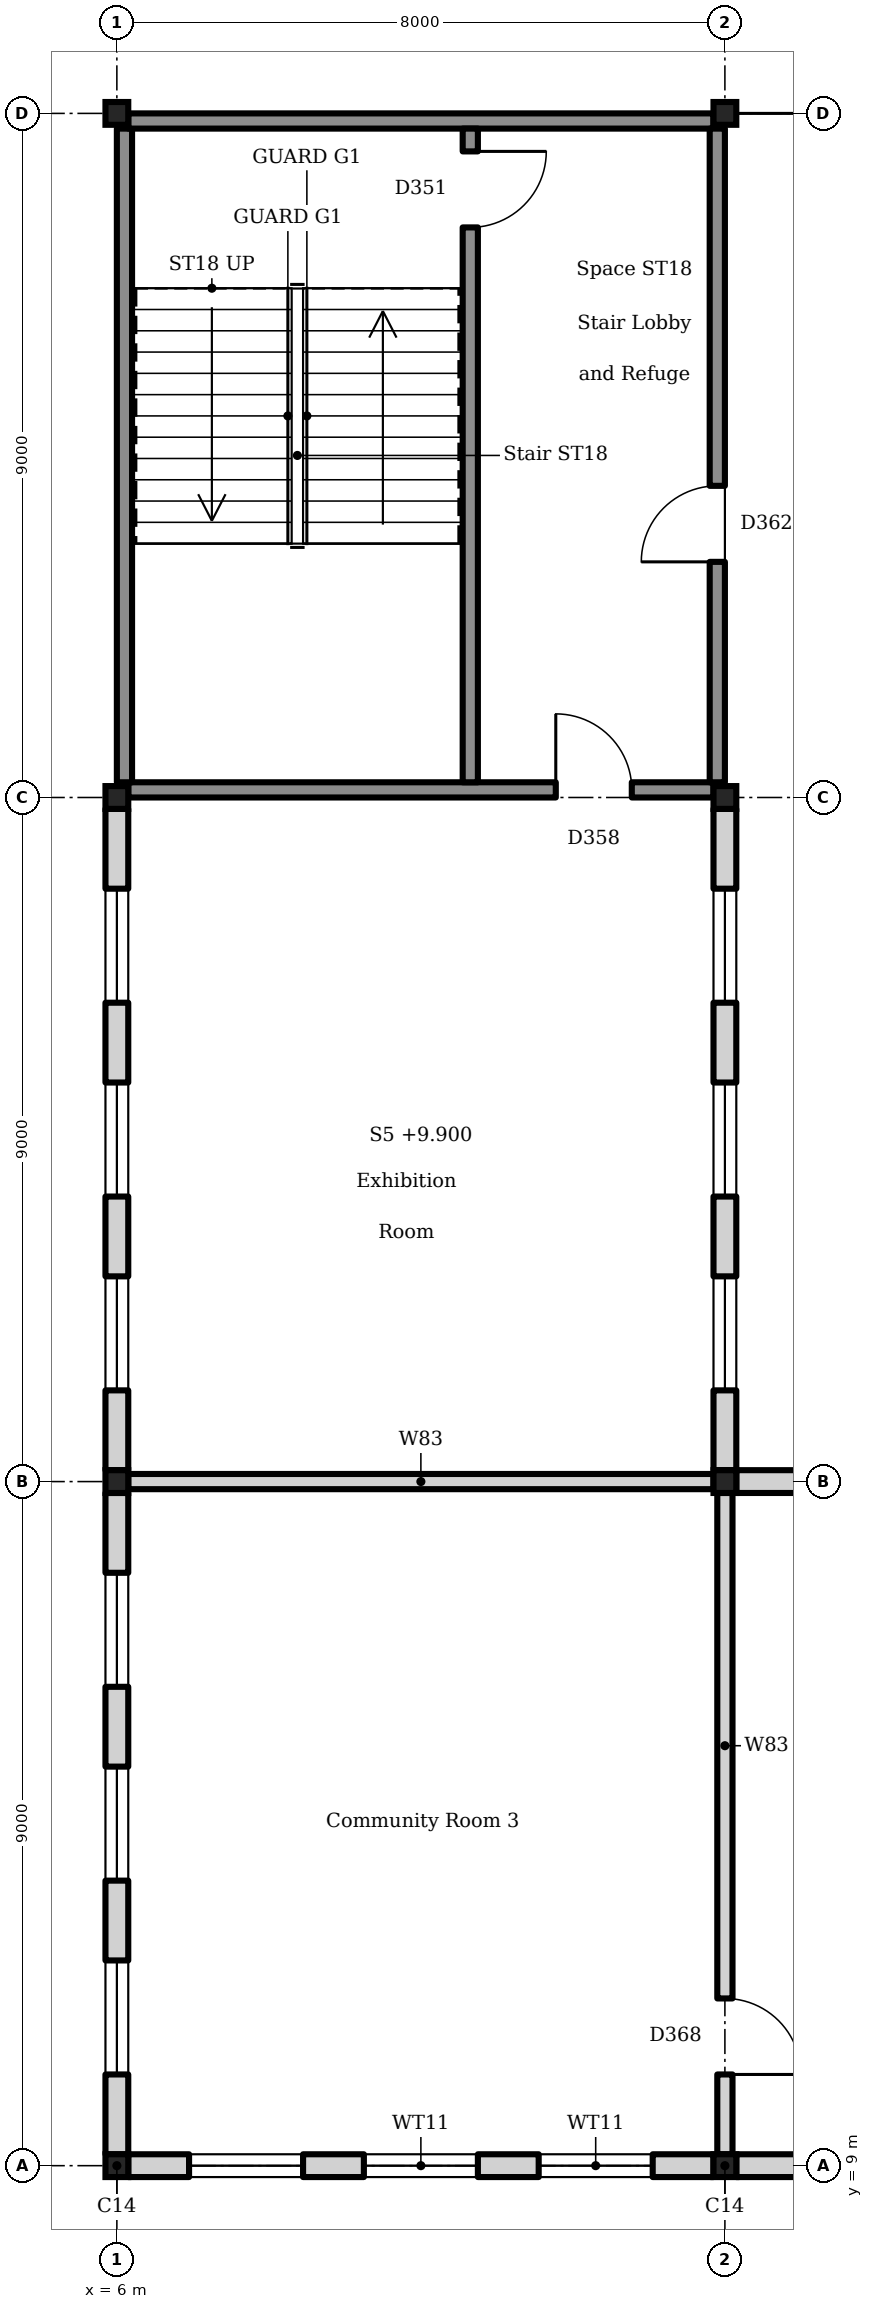
"""IFC4 building model, lengths in metres.
Left out: names, types, materials, properties, quantities, classifications, styles, units other than length and angle.
Written with IfcOpenShell. Run it as: python <this file> out.ifc"""

import sys

from ifc_helpers import new_model, si_unit, direction, frame, frame_2d, origin, origin_2d, place, context, subcontext, project, spatial, rectangle, i_section, extrude, element, fill, save


model = new_model("IFC4")
c1 = context("Model", 3, precision=1e-05, world=origin(), true_north=direction((0.0, 1.0)))
c2 = subcontext(c1, "Body", "Model", "MODEL_VIEW")
j1 = project(units=[si_unit("LENGTHUNIT", "METRE"), si_unit("PLANEANGLEUNIT", "RADIAN")], contexts=[c1])
p1 = place(None, origin())
s1 = spatial("IfcSite", under=j1, at=p1, CompositionType="ELEMENT")
p2 = place(p1, origin())
s2 = spatial("IfcBuilding", under=s1, at=p2, CompositionType="ELEMENT")
p3 = place(p2, frame((0.0, 0.0, 9.9)))
s3 = spatial("IfcBuildingStorey", under=s2, at=p3, CompositionType="ELEMENT", Elevation=9.9)
for number, where, z_axis, x_axis in (
    (1, (6.0, 9.0, 0.0), (0.0, 0.0, 1.0), (1.0, 0.0, 0.0)),
    (2, (6.0, 18.0, 0.0), (0.0, 0.0, 1.0), (1.0, 0.0, 0.0)),
):
    element("IfcColumn", number, at=place(p3, frame(where, z_axis=z_axis, x_axis=x_axis)), inside=s3, PredefinedType="COLUMN", context=c2, shape_type="SweptSolid", body=[
        extrude(i_section(OverallWidth=0.3, OverallDepth=0.3, WebThickness=0.011, FlangeThickness=0.019, FilletRadius=0.027, at=origin_2d()), origin(), (0.0, 0.0, 1.0), 4.3),
    ])
for number, where, z_axis, x_axis in (
    (3, (6.0, 27.0, 0.0), (0.0, 0.0, 1.0), (1.0, 0.0, 0.0)),
    (4, (6.0, 36.0, 0.0), (0.0, 0.0, 1.0), (1.0, 0.0, 0.0)),
):
    element("IfcColumn", number, at=place(p3, frame(where, z_axis=z_axis, x_axis=x_axis)), inside=s3, PredefinedType="COLUMN", context=c2, shape_type="SweptSolid", body=[
        extrude(i_section(OverallWidth=0.3, OverallDepth=0.3, WebThickness=0.011, FlangeThickness=0.019, FilletRadius=0.027, at=origin_2d()), origin(), (0.0, 0.0, 1.0), 4.5),
    ])
for number, where, z_axis, x_axis in (
    (5, (14.0, 9.0, 0.0), (0.0, 0.0, 1.0), (1.0, 0.0, 0.0)),
    (6, (14.0, 18.0, 0.0), (0.0, 0.0, 1.0), (1.0, 0.0, 0.0)),
):
    element("IfcColumn", number, at=place(p3, frame(where, z_axis=z_axis, x_axis=x_axis)), inside=s3, PredefinedType="COLUMN", context=c2, shape_type="SweptSolid", body=[
        extrude(i_section(OverallWidth=0.3, OverallDepth=0.3, WebThickness=0.011, FlangeThickness=0.019, FilletRadius=0.027, at=origin_2d()), origin(), (0.0, 0.0, 1.0), 4.3),
    ])
for number, where, z_axis, x_axis in (
    (7, (14.0, 27.0, 0.0), (0.0, 0.0, 1.0), (1.0, 0.0, 0.0)),
    (8, (14.0, 36.0, 0.0), (0.0, 0.0, 1.0), (1.0, 0.0, 0.0)),
):
    element("IfcColumn", number, at=place(p3, frame(where, z_axis=z_axis, x_axis=x_axis)), inside=s3, PredefinedType="COLUMN", context=c2, shape_type="SweptSolid", body=[
        extrude(i_section(OverallWidth=0.3, OverallDepth=0.3, WebThickness=0.011, FlangeThickness=0.019, FilletRadius=0.027, at=origin_2d()), origin(), (0.0, 0.0, 1.0), 4.5),
    ])
p4 = place(p3, frame((6.15, 9.0, 0.0), z_axis=(0.0, 0.0, 1.0), x_axis=(1.0, 0.0, 0.0)))
e9 = element("IfcWall", 9, at=p4, inside=s3, PredefinedType="SOLIDWALL", context=c2, shape_type="SweptSolid", body=[
    extrude(rectangle(XDim=7.7, YDim=0.3, at=frame_2d((3.85, 0.0))), origin(), (0.0, 0.0, 1.0), 3.93),
])
p5 = place(p4, frame((0.8, 0.0, 1.1)))
e10 = element("IfcOpeningElement", 10, at=p5, cuts=e9, PredefinedType="OPENING", context=c2, shape_type="SweptSolid", body=[
    extrude(rectangle(XDim=1.5, YDim=2.4, at=frame_2d((0.75, 1.2))), frame((0.0, 0.16, 0.0), z_axis=(0.0, -1.0, 0.0), x_axis=(1.0, 0.0, 0.0)), (0.0, 0.0, 1.0), 0.32),
])
p6 = place(p4, frame((3.1, 0.0, 1.1)))
e11 = element("IfcOpeningElement", 11, at=p6, cuts=e9, PredefinedType="OPENING", context=c2, shape_type="SweptSolid", body=[
    extrude(rectangle(XDim=1.5, YDim=2.4, at=frame_2d((0.75, 1.2))), frame((0.0, 0.16, 0.0), z_axis=(0.0, -1.0, 0.0), x_axis=(1.0, 0.0, 0.0)), (0.0, 0.0, 1.0), 0.32),
])
p7 = place(p4, frame((5.4, 0.0, 1.1)))
e12 = element("IfcOpeningElement", 12, at=p7, cuts=e9, PredefinedType="OPENING", context=c2, shape_type="SweptSolid", body=[
    extrude(rectangle(XDim=1.5, YDim=2.4, at=frame_2d((0.75, 1.2))), frame((0.0, 0.16, 0.0), z_axis=(0.0, -1.0, 0.0), x_axis=(1.0, 0.0, 0.0)), (0.0, 0.0, 1.0), 0.32),
])
p8 = place(p3, frame((14.15, 9.0, 0.0), z_axis=(0.0, 0.0, 1.0), x_axis=(1.0, 0.0, 0.0)))
e13 = element("IfcWall", 13, at=p8, inside=s3, PredefinedType="SOLIDWALL", context=c2, shape_type="SweptSolid", body=[
    extrude(rectangle(XDim=7.7, YDim=0.3, at=frame_2d((3.85, 0.0))), origin(), (0.0, 0.0, 1.0), 3.93),
])
p9 = place(p8, frame((0.8, 0.0, 1.1)))
e14 = element("IfcOpeningElement", 14, at=p9, cuts=e13, PredefinedType="OPENING", context=c2, shape_type="SweptSolid", body=[
    extrude(rectangle(XDim=1.5, YDim=2.4, at=frame_2d((0.75, 1.2))), frame((0.0, 0.16, 0.0), z_axis=(0.0, -1.0, 0.0), x_axis=(1.0, 0.0, 0.0)), (0.0, 0.0, 1.0), 0.32),
])
p10 = place(p8, frame((3.1, 0.0, 1.1)))
e15 = element("IfcOpeningElement", 15, at=p10, cuts=e13, PredefinedType="OPENING", context=c2, shape_type="SweptSolid", body=[
    extrude(rectangle(XDim=1.5, YDim=2.4, at=frame_2d((0.75, 1.2))), frame((0.0, 0.16, 0.0), z_axis=(0.0, -1.0, 0.0), x_axis=(1.0, 0.0, 0.0)), (0.0, 0.0, 1.0), 0.32),
])
p11 = place(p3, frame((6.0, 9.15, 0.0), z_axis=(0.0, 0.0, 1.0), x_axis=(0.0, 1.0, 0.0)))
e16 = element("IfcWall", 16, at=p11, inside=s3, PredefinedType="SOLIDWALL", context=c2, shape_type="SweptSolid", body=[
    extrude(rectangle(XDim=8.7, YDim=0.3, at=frame_2d((4.35, 0.0))), origin(), (0.0, 0.0, 1.0), 3.93),
])
p12 = place(p11, frame((1.05, 0.0, 1.1)))
e17 = element("IfcOpeningElement", 17, at=p12, cuts=e16, PredefinedType="OPENING", context=c2, shape_type="SweptSolid", body=[
    extrude(rectangle(XDim=1.5, YDim=2.4, at=frame_2d((0.75, 1.2))), frame((0.0, 0.16, 0.0), z_axis=(0.0, -1.0, 0.0), x_axis=(1.0, 0.0, 0.0)), (0.0, 0.0, 1.0), 0.32),
])
p13 = place(p11, frame((3.6, 0.0, 1.1)))
e18 = element("IfcOpeningElement", 18, at=p13, cuts=e16, PredefinedType="OPENING", context=c2, shape_type="SweptSolid", body=[
    extrude(rectangle(XDim=1.5, YDim=2.4, at=frame_2d((0.75, 1.2))), frame((0.0, 0.16, 0.0), z_axis=(0.0, -1.0, 0.0), x_axis=(1.0, 0.0, 0.0)), (0.0, 0.0, 1.0), 0.32),
])
p14 = place(p11, frame((6.15, 0.0, 1.1)))
e19 = element("IfcOpeningElement", 19, at=p14, cuts=e16, PredefinedType="OPENING", context=c2, shape_type="SweptSolid", body=[
    extrude(rectangle(XDim=1.5, YDim=2.4, at=frame_2d((0.75, 1.2))), frame((0.0, 0.16, 0.0), z_axis=(0.0, -1.0, 0.0), x_axis=(1.0, 0.0, 0.0)), (0.0, 0.0, 1.0), 0.32),
])
p15 = place(p3, frame((6.0, 18.15, 0.0), z_axis=(0.0, 0.0, 1.0), x_axis=(0.0, 1.0, 0.0)))
e20 = element("IfcWall", 20, at=p15, inside=s3, PredefinedType="SOLIDWALL", context=c2, shape_type="SweptSolid", body=[
    extrude(rectangle(XDim=8.7, YDim=0.3, at=frame_2d((4.35, 0.0))), origin(), (0.0, 0.0, 1.0), 3.93),
])
p16 = place(p15, frame((1.05, 0.0, 1.1)))
e21 = element("IfcOpeningElement", 21, at=p16, cuts=e20, PredefinedType="OPENING", context=c2, shape_type="SweptSolid", body=[
    extrude(rectangle(XDim=1.5, YDim=2.4, at=frame_2d((0.75, 1.2))), frame((0.0, 0.16, 0.0), z_axis=(0.0, -1.0, 0.0), x_axis=(1.0, 0.0, 0.0)), (0.0, 0.0, 1.0), 0.32),
])
p17 = place(p15, frame((3.6, 0.0, 1.1)))
e22 = element("IfcOpeningElement", 22, at=p17, cuts=e20, PredefinedType="OPENING", context=c2, shape_type="SweptSolid", body=[
    extrude(rectangle(XDim=1.5, YDim=2.4, at=frame_2d((0.75, 1.2))), frame((0.0, 0.16, 0.0), z_axis=(0.0, -1.0, 0.0), x_axis=(1.0, 0.0, 0.0)), (0.0, 0.0, 1.0), 0.32),
])
p18 = place(p15, frame((6.15, 0.0, 1.1)))
e23 = element("IfcOpeningElement", 23, at=p18, cuts=e20, PredefinedType="OPENING", context=c2, shape_type="SweptSolid", body=[
    extrude(rectangle(XDim=1.5, YDim=2.4, at=frame_2d((0.75, 1.2))), frame((0.0, 0.16, 0.0), z_axis=(0.0, -1.0, 0.0), x_axis=(1.0, 0.0, 0.0)), (0.0, 0.0, 1.0), 0.32),
])
p19 = place(p3, frame((14.0, 18.15, 0.0), z_axis=(0.0, 0.0, 1.0), x_axis=(0.0, 1.0, 0.0)))
e24 = element("IfcWall", 24, at=p19, inside=s3, PredefinedType="SOLIDWALL", context=c2, shape_type="SweptSolid", body=[
    extrude(rectangle(XDim=8.7, YDim=0.3, at=frame_2d((4.35, 0.0))), origin(), (0.0, 0.0, 1.0), 3.93),
])
p20 = place(p19, frame((1.05, 0.0, 1.1)))
e25 = element("IfcOpeningElement", 25, at=p20, cuts=e24, PredefinedType="OPENING", context=c2, shape_type="SweptSolid", body=[
    extrude(rectangle(XDim=1.5, YDim=2.4, at=frame_2d((0.75, 1.2))), frame((0.0, 0.16, 0.0), z_axis=(0.0, -1.0, 0.0), x_axis=(1.0, 0.0, 0.0)), (0.0, 0.0, 1.0), 0.32),
])
p21 = place(p19, frame((3.6, 0.0, 1.1)))
e26 = element("IfcOpeningElement", 26, at=p21, cuts=e24, PredefinedType="OPENING", context=c2, shape_type="SweptSolid", body=[
    extrude(rectangle(XDim=1.5, YDim=2.4, at=frame_2d((0.75, 1.2))), frame((0.0, 0.16, 0.0), z_axis=(0.0, -1.0, 0.0), x_axis=(1.0, 0.0, 0.0)), (0.0, 0.0, 1.0), 0.32),
])
p22 = place(p19, frame((6.15, 0.0, 1.1)))
e27 = element("IfcOpeningElement", 27, at=p22, cuts=e24, PredefinedType="OPENING", context=c2, shape_type="SweptSolid", body=[
    extrude(rectangle(XDim=1.5, YDim=2.4, at=frame_2d((0.75, 1.2))), frame((0.0, 0.16, 0.0), z_axis=(0.0, -1.0, 0.0), x_axis=(1.0, 0.0, 0.0)), (0.0, 0.0, 1.0), 0.32),
])
p23 = place(p3, frame((14.15, 18.0, 0.0), z_axis=(0.0, 0.0, 1.0), x_axis=(1.0, 0.0, 0.0)))
e28 = element("IfcWall", 28, at=p23, inside=s3, PredefinedType="SOLIDWALL", context=c2, shape_type="SweptSolid", body=[
    extrude(rectangle(XDim=7.7, YDim=0.3, at=frame_2d((3.85, 0.0))), origin(), (0.0, 0.0, 1.0), 3.93),
])
p24 = place(p23, frame((2.95, 0.0, 0.0)))
e29 = element("IfcOpeningElement", 29, at=p24, cuts=e28, PredefinedType="OPENING", context=c2, shape_type="SweptSolid", body=[
    extrude(rectangle(XDim=1.8, YDim=2.4, at=frame_2d((0.9, 1.2))), frame((0.0, 0.16, 0.0), z_axis=(0.0, -1.0, 0.0), x_axis=(1.0, 0.0, 0.0)), (0.0, 0.0, 1.0), 0.32),
])
p25 = place(p3, frame((6.15, 27.1, 0.0), z_axis=(0.0, 0.0, 1.0), x_axis=(1.0, 0.0, 0.0)))
e30 = element("IfcWall", 30, at=p25, inside=s3, PredefinedType="SOLIDWALL", context=c2, shape_type="SweptSolid", body=[
    extrude(rectangle(XDim=7.7, YDim=0.2, at=frame_2d((3.85, 0.0))), origin(), (0.0, 0.0, 1.0), 4.3),
])
p26 = place(p25, frame((5.625, 0.0, 0.0)))
e31 = element("IfcOpeningElement", 31, at=p26, cuts=e30, PredefinedType="OPENING", context=c2, shape_type="SweptSolid", body=[
    extrude(rectangle(XDim=1.0, YDim=2.1, at=frame_2d((0.5, 1.05))), frame((0.0, 0.11, 0.0), z_axis=(0.0, -1.0, 0.0), x_axis=(1.0, 0.0, 0.0)), (0.0, 0.0, 1.0), 0.22),
])
p27 = place(p3, frame((6.1, 27.2, 0.0), z_axis=(0.0, 0.0, 1.0), x_axis=(0.0, 1.0, 0.0)))
e32 = element("IfcWall", 32, at=p27, inside=s3, PredefinedType="SOLIDWALL", context=c2, shape_type="SweptSolid", body=[
    extrude(rectangle(XDim=8.6, YDim=0.2, at=frame_2d((4.3, 0.0))), origin(), (0.0, 0.0, 1.0), 4.3),
])
p28 = place(p3, frame((6.15, 35.9, 0.0), z_axis=(0.0, 0.0, 1.0), x_axis=(1.0, 0.0, 0.0)))
e33 = element("IfcWall", 33, at=p28, inside=s3, PredefinedType="SOLIDWALL", context=c2, shape_type="SweptSolid", body=[
    extrude(rectangle(XDim=7.7, YDim=0.2, at=frame_2d((3.85, 0.0))), origin(), (0.0, 0.0, 1.0), 4.3),
])
p29 = place(p3, frame((13.9, 27.2, 0.0), z_axis=(0.0, 0.0, 1.0), x_axis=(0.0, 1.0, 0.0)))
e34 = element("IfcWall", 34, at=p29, inside=s3, PredefinedType="SOLIDWALL", context=c2, shape_type="SweptSolid", body=[
    extrude(rectangle(XDim=8.6, YDim=0.2, at=frame_2d((4.3, 0.0))), origin(), (0.0, 0.0, 1.0), 4.3),
])
p30 = place(p29, frame((2.9, 0.0, 0.0)))
e35 = element("IfcOpeningElement", 35, at=p30, cuts=e34, PredefinedType="OPENING", context=c2, shape_type="SweptSolid", body=[
    extrude(rectangle(XDim=1.0, YDim=2.1, at=frame_2d((0.5, 1.05))), frame((0.0, 0.11, 0.0), z_axis=(0.0, -1.0, 0.0), x_axis=(1.0, 0.0, 0.0)), (0.0, 0.0, 1.0), 0.22),
])
p31 = place(p3, frame((10.65, 27.2, 0.0), z_axis=(0.0, 0.0, 1.0), x_axis=(0.0, 1.0, 0.0)))
e36 = element("IfcWall", 36, at=p31, inside=s3, PredefinedType="SOLIDWALL", context=c2, shape_type="SweptSolid", body=[
    extrude(rectangle(XDim=8.6, YDim=0.2, at=frame_2d((4.3, 0.0))), origin(), (0.0, 0.0, 1.0), 4.3),
])
p32 = place(p31, frame((7.3, 0.0, 0.0)))
e37 = element("IfcOpeningElement", 37, at=p32, cuts=e36, PredefinedType="OPENING", context=c2, shape_type="SweptSolid", body=[
    extrude(rectangle(XDim=1.0, YDim=2.1, at=frame_2d((0.5, 1.05))), frame((0.0, 0.11, 0.0), z_axis=(0.0, -1.0, 0.0), x_axis=(1.0, 0.0, 0.0)), (0.0, 0.0, 1.0), 0.22),
])
p33 = place(p3, frame((6.15, 18.0, 0.0), z_axis=(0.0, 0.0, 1.0), x_axis=(1.0, 0.0, 0.0)))
e38 = element("IfcWall", 38, at=p33, inside=s3, PredefinedType="PARTITIONING", context=c2, shape_type="SweptSolid", body=[
    extrude(rectangle(XDim=7.7, YDim=0.2, at=frame_2d((3.85, 0.0))), origin(), (0.0, 0.0, 1.0), 3.93),
])
p34 = place(p3, frame((14.0, 9.15, 0.0), z_axis=(0.0, 0.0, 1.0), x_axis=(0.0, 1.0, 0.0)))
e39 = element("IfcWall", 39, at=p34, inside=s3, PredefinedType="PARTITIONING", context=c2, shape_type="SweptSolid", body=[
    extrude(rectangle(XDim=8.7, YDim=0.2, at=frame_2d((4.35, 0.0))), origin(), (0.0, 0.0, 1.0), 3.93),
])
p35 = place(p34, frame((1.05, 0.0, 0.0)))
e40 = element("IfcOpeningElement", 40, at=p35, cuts=e39, PredefinedType="OPENING", context=c2, shape_type="SweptSolid", body=[
    extrude(rectangle(XDim=1.0, YDim=2.1, at=frame_2d((0.5, 1.05))), frame((0.0, 0.11, 0.0), z_axis=(0.0, -1.0, 0.0), x_axis=(1.0, 0.0, 0.0)), (0.0, 0.0, 1.0), 0.22),
])
p36 = place(p5, origin())
e41 = element("IfcWindow", 41, at=p36, inside=s3, PartitioningType="SINGLE_PANEL", PredefinedType="WINDOW", context=c2, shape_type="SweptSolid", body=[
    extrude(rectangle(XDim=1.5, YDim=2.4, at=frame_2d((0.75, 1.2))), frame((0.0, 0.03, 0.0), z_axis=(0.0, -1.0, 0.0), x_axis=(1.0, 0.0, 0.0)), (0.0, 0.0, 1.0), 0.06),
])
fill(e10, e41)
p37 = place(p6, origin())
e42 = element("IfcWindow", 42, at=p37, inside=s3, PartitioningType="SINGLE_PANEL", PredefinedType="WINDOW", context=c2, shape_type="SweptSolid", body=[
    extrude(rectangle(XDim=1.5, YDim=2.4, at=frame_2d((0.75, 1.2))), frame((0.0, 0.03, 0.0), z_axis=(0.0, -1.0, 0.0), x_axis=(1.0, 0.0, 0.0)), (0.0, 0.0, 1.0), 0.06),
])
fill(e11, e42)
p38 = place(p7, origin())
e43 = element("IfcWindow", 43, at=p38, inside=s3, PartitioningType="SINGLE_PANEL", PredefinedType="WINDOW", context=c2, shape_type="SweptSolid", body=[
    extrude(rectangle(XDim=1.5, YDim=2.4, at=frame_2d((0.75, 1.2))), frame((0.0, 0.03, 0.0), z_axis=(0.0, -1.0, 0.0), x_axis=(1.0, 0.0, 0.0)), (0.0, 0.0, 1.0), 0.06),
])
fill(e12, e43)
p39 = place(p12, origin())
e44 = element("IfcWindow", 44, at=p39, inside=s3, PartitioningType="SINGLE_PANEL", PredefinedType="WINDOW", context=c2, shape_type="SweptSolid", body=[
    extrude(rectangle(XDim=1.5, YDim=2.4, at=frame_2d((0.75, 1.2))), frame((0.0, 0.03, 0.0), z_axis=(0.0, -1.0, 0.0), x_axis=(1.0, 0.0, 0.0)), (0.0, 0.0, 1.0), 0.06),
])
fill(e17, e44)
p40 = place(p13, origin())
e45 = element("IfcWindow", 45, at=p40, inside=s3, PartitioningType="SINGLE_PANEL", PredefinedType="WINDOW", context=c2, shape_type="SweptSolid", body=[
    extrude(rectangle(XDim=1.5, YDim=2.4, at=frame_2d((0.75, 1.2))), frame((0.0, 0.03, 0.0), z_axis=(0.0, -1.0, 0.0), x_axis=(1.0, 0.0, 0.0)), (0.0, 0.0, 1.0), 0.06),
])
fill(e18, e45)
p41 = place(p14, origin())
e46 = element("IfcWindow", 46, at=p41, inside=s3, PartitioningType="SINGLE_PANEL", PredefinedType="WINDOW", context=c2, shape_type="SweptSolid", body=[
    extrude(rectangle(XDim=1.5, YDim=2.4, at=frame_2d((0.75, 1.2))), frame((0.0, 0.03, 0.0), z_axis=(0.0, -1.0, 0.0), x_axis=(1.0, 0.0, 0.0)), (0.0, 0.0, 1.0), 0.06),
])
fill(e19, e46)
p42 = place(p16, origin())
e47 = element("IfcWindow", 47, at=p42, inside=s3, PartitioningType="SINGLE_PANEL", PredefinedType="WINDOW", context=c2, shape_type="SweptSolid", body=[
    extrude(rectangle(XDim=1.5, YDim=2.4, at=frame_2d((0.75, 1.2))), frame((0.0, 0.03, 0.0), z_axis=(0.0, -1.0, 0.0), x_axis=(1.0, 0.0, 0.0)), (0.0, 0.0, 1.0), 0.06),
])
fill(e21, e47)
p43 = place(p17, origin())
e48 = element("IfcWindow", 48, at=p43, inside=s3, PartitioningType="SINGLE_PANEL", PredefinedType="WINDOW", context=c2, shape_type="SweptSolid", body=[
    extrude(rectangle(XDim=1.5, YDim=2.4, at=frame_2d((0.75, 1.2))), frame((0.0, 0.03, 0.0), z_axis=(0.0, -1.0, 0.0), x_axis=(1.0, 0.0, 0.0)), (0.0, 0.0, 1.0), 0.06),
])
fill(e22, e48)
p44 = place(p18, origin())
e49 = element("IfcWindow", 49, at=p44, inside=s3, PartitioningType="SINGLE_PANEL", PredefinedType="WINDOW", context=c2, shape_type="SweptSolid", body=[
    extrude(rectangle(XDim=1.5, YDim=2.4, at=frame_2d((0.75, 1.2))), frame((0.0, 0.03, 0.0), z_axis=(0.0, -1.0, 0.0), x_axis=(1.0, 0.0, 0.0)), (0.0, 0.0, 1.0), 0.06),
])
fill(e23, e49)
p45 = place(p20, origin())
e50 = element("IfcWindow", 50, at=p45, inside=s3, PartitioningType="SINGLE_PANEL", PredefinedType="WINDOW", context=c2, shape_type="SweptSolid", body=[
    extrude(rectangle(XDim=1.5, YDim=2.4, at=frame_2d((0.75, 1.2))), frame((0.0, 0.03, 0.0), z_axis=(0.0, -1.0, 0.0), x_axis=(1.0, 0.0, 0.0)), (0.0, 0.0, 1.0), 0.06),
])
fill(e25, e50)
p46 = place(p21, origin())
e51 = element("IfcWindow", 51, at=p46, inside=s3, PartitioningType="SINGLE_PANEL", PredefinedType="WINDOW", context=c2, shape_type="SweptSolid", body=[
    extrude(rectangle(XDim=1.5, YDim=2.4, at=frame_2d((0.75, 1.2))), frame((0.0, 0.03, 0.0), z_axis=(0.0, -1.0, 0.0), x_axis=(1.0, 0.0, 0.0)), (0.0, 0.0, 1.0), 0.06),
])
fill(e26, e51)
p47 = place(p22, origin())
e52 = element("IfcWindow", 52, at=p47, inside=s3, PartitioningType="SINGLE_PANEL", PredefinedType="WINDOW", context=c2, shape_type="SweptSolid", body=[
    extrude(rectangle(XDim=1.5, YDim=2.4, at=frame_2d((0.75, 1.2))), frame((0.0, 0.03, 0.0), z_axis=(0.0, -1.0, 0.0), x_axis=(1.0, 0.0, 0.0)), (0.0, 0.0, 1.0), 0.06),
])
fill(e27, e52)
p48 = place(p32, frame((1.0, 0.0, 0.0), z_axis=(0.0, 0.0, 1.0), x_axis=(-1.0, 0.0, 0.0)))
e53 = element("IfcDoor", 53, at=p48, inside=s3, OperationType="SINGLE_SWING_RIGHT", PredefinedType="DOOR", context=c2, shape_type="SweptSolid", body=[
    extrude(rectangle(XDim=1.0, YDim=2.1, at=frame_2d((0.5, 1.05))), frame((0.0, 0.025, 0.0), z_axis=(0.0, -1.0, 0.0), x_axis=(1.0, 0.0, 0.0)), (0.0, 0.0, 1.0), 0.05),
])
fill(e37, e53)
p49 = place(p26, origin())
e54 = element("IfcDoor", 54, at=p49, inside=s3, OperationType="SINGLE_SWING_RIGHT", PredefinedType="DOOR", context=c2, shape_type="SweptSolid", body=[
    extrude(rectangle(XDim=1.0, YDim=2.1, at=frame_2d((0.5, 1.05))), frame((0.0, 0.025, 0.0), z_axis=(0.0, -1.0, 0.0), x_axis=(1.0, 0.0, 0.0)), (0.0, 0.0, 1.0), 0.05),
])
fill(e31, e54)
p50 = place(p30, origin())
e55 = element("IfcDoor", 55, at=p50, inside=s3, OperationType="SINGLE_SWING_RIGHT", PredefinedType="DOOR", context=c2, shape_type="SweptSolid", body=[
    extrude(rectangle(XDim=1.0, YDim=2.1, at=frame_2d((0.5, 1.05))), frame((0.0, 0.025, 0.0), z_axis=(0.0, -1.0, 0.0), x_axis=(1.0, 0.0, 0.0)), (0.0, 0.0, 1.0), 0.05),
])
fill(e35, e55)
p51 = place(p35, frame((1.0, 0.0, 0.0), z_axis=(0.0, 0.0, 1.0), x_axis=(-1.0, 0.0, 0.0)))
e56 = element("IfcDoor", 56, at=p51, inside=s3, OperationType="SINGLE_SWING_LEFT", PredefinedType="DOOR", context=c2, shape_type="SweptSolid", body=[
    extrude(rectangle(XDim=1.0, YDim=2.1, at=frame_2d((0.5, 1.05))), frame((0.0, 0.025, 0.0), z_axis=(0.0, -1.0, 0.0), x_axis=(1.0, 0.0, 0.0)), (0.0, 0.0, 1.0), 0.05),
])
fill(e40, e56)
save(model, sys.argv[1])
